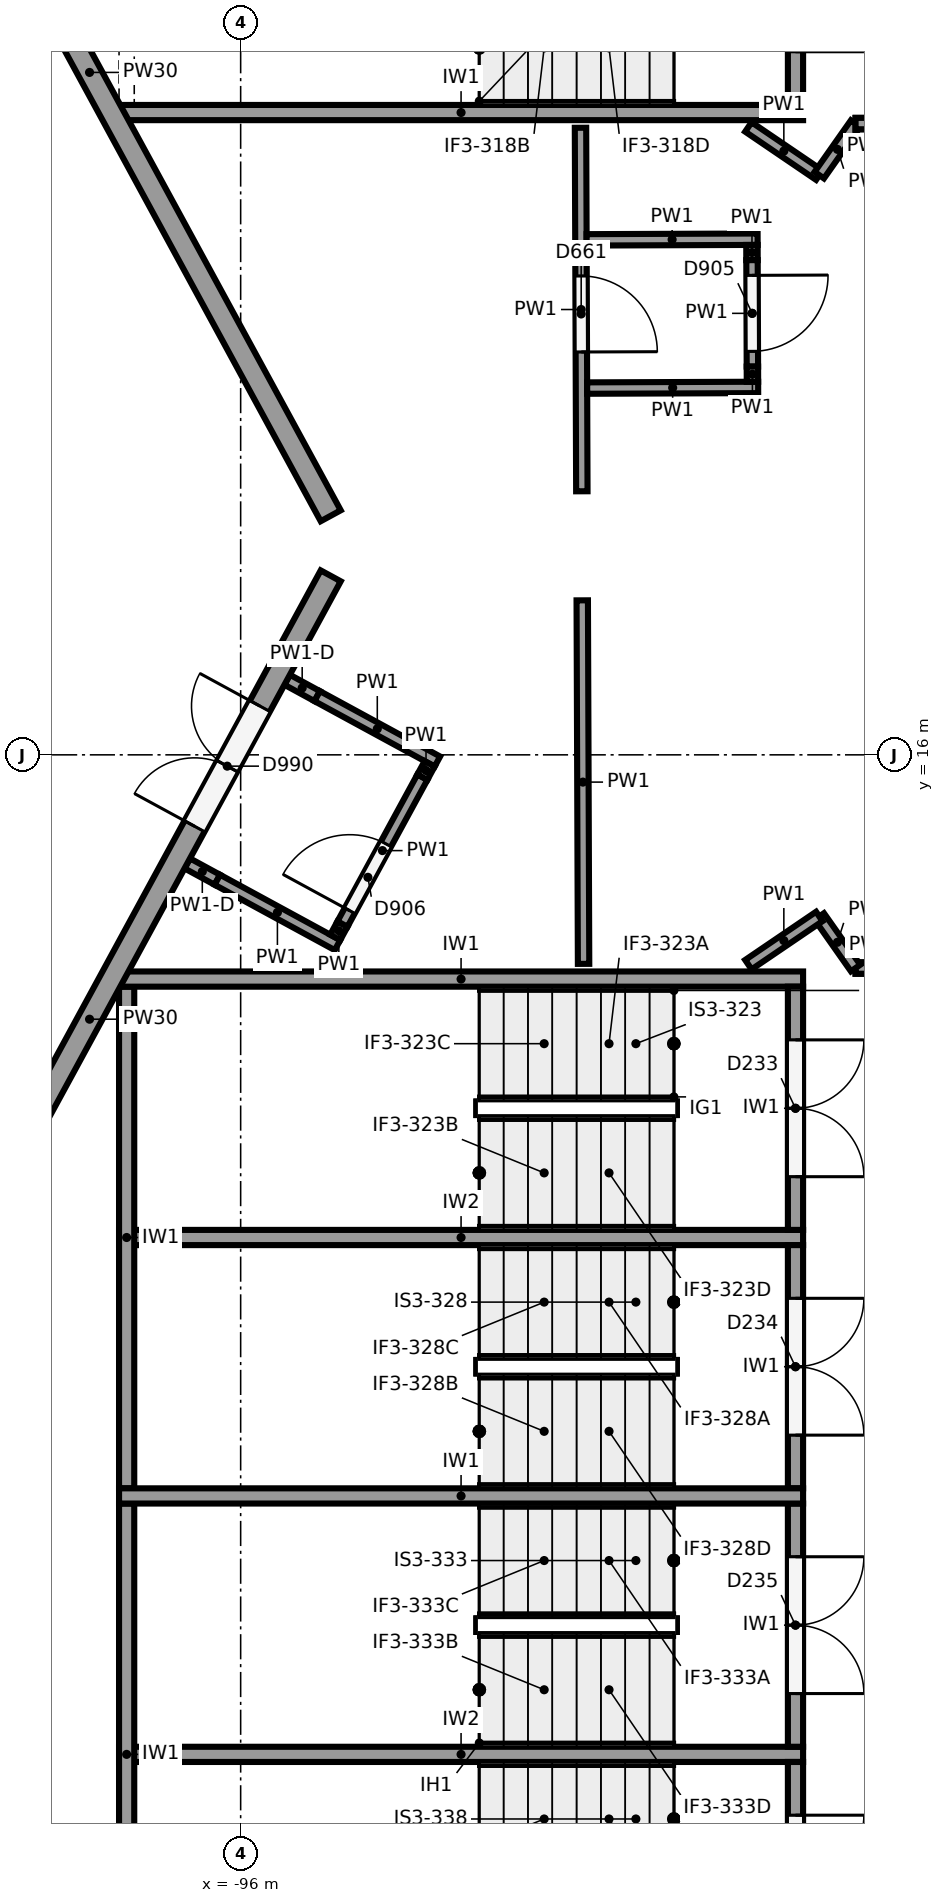
"""IFC4 building model, lengths in metres.
Left out: names, types, materials, properties, quantities, classifications, styles, units other than length and angle.
Written with IfcOpenShell. Run it as: python <this file> out.ifc"""

import sys

from ifc_helpers import new_model, si_unit, direction, frame, frame_2d, origin, origin_2d, place, context, subcontext, project, spatial, rectangle, circle, extrude, element, fill, save


model = new_model("IFC4")
c1 = context("Model", 3, precision=1e-05, world=origin(), true_north=direction((0.0, 1.0)))
c2 = subcontext(c1, "Body", "Model", "MODEL_VIEW")
j1 = project(units=[si_unit("LENGTHUNIT", "METRE"), si_unit("PLANEANGLEUNIT", "RADIAN")], contexts=[c1])
p1 = place(None, origin())
s1 = spatial("IfcSite", under=j1, at=p1, CompositionType="ELEMENT")
p2 = place(p1, origin())
s2 = spatial("IfcBuilding", under=s1, at=p2, CompositionType="ELEMENT")
p3 = place(p2, frame((0.0, 0.0, 6.5)))
s3 = spatial("IfcBuildingStorey", under=s2, at=p3, CompositionType="ELEMENT", Elevation=6.5)
p4 = place(p3, frame((-94.6, 18.75, 0.0), z_axis=(0.0, 0.0, 1.0), x_axis=(1.0, 0.0, 0.0)))
e1 = element("IfcColumn", 1, at=p4, inside=s3, PredefinedType="COLUMN", context=c2, shape_type="SweptSolid", body=[
    extrude(circle(Radius=0.45, at=origin_2d()), origin(), (0.0, 0.0, 1.0), 5.5),
])
p5 = place(p3, frame((-98.6, 18.75, 0.0), z_axis=(0.0, 0.0, 1.0), x_axis=(1.0, 0.0, 0.0)))
e2 = element("IfcColumn", 2, at=p5, inside=s3, PredefinedType="COLUMN", context=c2, shape_type="SweptSolid", body=[
    extrude(circle(Radius=0.4, at=origin_2d()), origin(), (0.0, 0.0, 1.0), 5.5),
])
p6 = place(p3, frame((-94.815, 19.145, 0.0), z_axis=(0.0, 0.0, 1.0), x_axis=(-0.477867771117, 0.878431780691, 0.0)))
e3 = element("IfcWall", 3, at=p6, inside=s3, PredefinedType="SOLIDWALL", context=c2, shape_type="SweptSolid", body=[
    extrude(rectangle(XDim=13.28, YDim=0.3, at=frame_2d((6.64, 0.0))), origin(), (0.0, 0.0, 1.0), 3.85),
])
p7 = place(p3, frame((-101.161, 6.689, 0.0), z_axis=(0.0, 0.0, 1.0), x_axis=(0.477867771117, 0.878431780691, 0.0)))
e4 = element("IfcWall", 4, at=p7, inside=s3, PredefinedType="SOLIDWALL", context=c2, shape_type="SweptSolid", body=[
    extrude(rectangle(XDim=13.28, YDim=0.3, at=frame_2d((6.64, 0.0))), origin(), (0.0, 0.0, 1.0), 3.85),
])
p8 = place(p7, frame((9.53, 0.0, 0.0)))
e5 = element("IfcOpeningElement", 5, at=p8, cuts=e4, PredefinedType="OPENING", context=c2, shape_type="SweptSolid", body=[
    extrude(rectangle(XDim=1.8, YDim=2.4, at=frame_2d((0.9, 1.2))), frame((0.0, 0.16, 0.0), z_axis=(0.0, -1.0, 0.0), x_axis=(1.0, 0.0, 0.0)), (0.0, 0.0, 1.0), 0.32),
])
p9 = place(p3, frame((-94.815, -5.855, 0.0), z_axis=(0.0, 0.0, 1.0), x_axis=(-0.477867771117, 0.878431780691, 0.0)))
e6 = element("IfcWall", 6, at=p9, inside=s3, PredefinedType="SOLIDWALL", context=c2, shape_type="SweptSolid", body=[
    extrude(rectangle(XDim=13.28, YDim=0.35, at=frame_2d((6.64, 0.0))), origin(), (0.0, 0.0, 1.0), 3.85),
])
p10 = place(p9, frame((3.95, 0.0, 0.0)))
e7 = element("IfcOpeningElement", 7, at=p10, cuts=e6, PredefinedType="OPENING", context=c2, shape_type="SweptSolid", body=[
    extrude(rectangle(XDim=1.0, YDim=2.1, at=frame_2d((0.5, 1.05))), frame((0.0, 0.185, 0.0), z_axis=(0.0, -1.0, 0.0), x_axis=(1.0, 0.0, 0.0)), (0.0, 0.0, 1.0), 0.37),
])
p11 = place(p3, frame((-97.6, 24.45, 0.0), z_axis=(0.0, 0.0, 1.0), x_axis=(1.0, 0.0, 0.0)))
e8 = element("IfcWall", 8, at=p11, inside=s3, PredefinedType="SHEAR", context=c2, shape_type="SweptSolid", body=[
    extrude(rectangle(XDim=9.0, YDim=0.2, at=frame_2d((4.5, 0.0))), origin(), (0.0, 0.0, 1.0), 5.15),
])
p12 = place(p3, frame((-97.5, 31.15, 0.0), z_axis=(0.0, 0.0, 1.0), x_axis=(0.0, -1.0, 0.0)))
e9 = element("IfcWall", 9, at=p12, inside=s3, PredefinedType="SHEAR", context=c2, shape_type="SweptSolid", body=[
    extrude(rectangle(XDim=6.6, YDim=0.2, at=frame_2d((3.3, 0.0))), origin(), (0.0, 0.0, 1.0), 5.15),
])
p13 = place(p3, frame((-88.7, 27.75, 0.0), z_axis=(0.0, 0.0, 1.0), x_axis=(0.0, -1.0, 0.0)))
e10 = element("IfcWall", 10, at=p13, inside=s3, PredefinedType="SHEAR", context=c2, shape_type="SweptSolid", body=[
    extrude(rectangle(XDim=3.2, YDim=0.2, at=frame_2d((1.6, 0.0))), origin(), (0.0, 0.0, 1.0), 5.15),
])
p14 = place(p13, frame((0.7, 0.0, 0.0)))
e11 = element("IfcOpeningElement", 11, at=p14, cuts=e10, PredefinedType="OPENING", context=c2, shape_type="SweptSolid", body=[
    extrude(rectangle(XDim=1.8, YDim=2.1, at=frame_2d((0.9, 1.05))), frame((0.0, 0.11, 0.0), z_axis=(0.0, -1.0, 0.0), x_axis=(1.0, 0.0, 0.0)), (0.0, 0.0, 1.0), 0.22),
])
for number, where, z_axis, x_axis in (
    (12, (-97.6, 13.05, 0.0), (0.0, 0.0, 1.0), (1.0, 0.0, 0.0)),
    (13, (-97.6, 6.25, 0.0), (0.0, 0.0, 1.0), (1.0, 0.0, 0.0)),
):
    element("IfcWall", number, at=place(p3, frame(where, z_axis=z_axis, x_axis=x_axis)), inside=s3, PredefinedType="SHEAR", context=c2, shape_type="SweptSolid", body=[
        extrude(rectangle(XDim=9.0, YDim=0.2, at=frame_2d((4.5, 0.0))), origin(), (0.0, 0.0, 1.0), 5.15),
    ])
for number, where, z_axis, x_axis in (
    (14, (-97.5, 12.95, 0.0), (0.0, 0.0, 1.0), (0.0, -1.0, 0.0)),
    (15, (-97.5, 6.15, 0.0), (0.0, 0.0, 1.0), (0.0, -1.0, 0.0)),
):
    element("IfcWall", number, at=place(p3, frame(where, z_axis=z_axis, x_axis=x_axis)), inside=s3, PredefinedType="SHEAR", context=c2, shape_type="SweptSolid", body=[
        extrude(rectangle(XDim=6.6, YDim=0.2, at=frame_2d((3.3, 0.0))), origin(), (0.0, 0.0, 1.0), 5.15),
    ])
for number, where, z_axis, x_axis in (
    (16, (-97.6, 9.65, 0.0), (0.0, 0.0, 1.0), (1.0, 0.0, 0.0)),
    (17, (-97.6, 2.85, 0.0), (0.0, 0.0, 1.0), (1.0, 0.0, 0.0)),
):
    element("IfcWall", number, at=place(p3, frame(where, z_axis=z_axis, x_axis=x_axis)), inside=s3, PredefinedType="SHEAR", context=c2, shape_type="SweptSolid", body=[
        extrude(rectangle(XDim=9.0, YDim=0.2, at=frame_2d((4.5, 0.0))), origin(), (0.0, 0.0, 1.0), 5.15),
    ])
p15 = place(p3, frame((-88.7, 12.95, 0.0), z_axis=(0.0, 0.0, 1.0), x_axis=(0.0, -1.0, 0.0)))
e18 = element("IfcWall", 18, at=p15, inside=s3, PredefinedType="SHEAR", context=c2, shape_type="SweptSolid", body=[
    extrude(rectangle(XDim=3.2, YDim=0.2, at=frame_2d((1.6, 0.0))), origin(), (0.0, 0.0, 1.0), 5.15),
])
p16 = place(p15, frame((0.7, 0.0, 0.0)))
e19 = element("IfcOpeningElement", 19, at=p16, cuts=e18, PredefinedType="OPENING", context=c2, shape_type="SweptSolid", body=[
    extrude(rectangle(XDim=1.8, YDim=2.1, at=frame_2d((0.9, 1.05))), frame((0.0, 0.11, 0.0), z_axis=(0.0, -1.0, 0.0), x_axis=(1.0, 0.0, 0.0)), (0.0, 0.0, 1.0), 0.22),
])
p17 = place(p3, frame((-88.7, 9.55, 0.0), z_axis=(0.0, 0.0, 1.0), x_axis=(0.0, -1.0, 0.0)))
e20 = element("IfcWall", 20, at=p17, inside=s3, PredefinedType="SHEAR", context=c2, shape_type="SweptSolid", body=[
    extrude(rectangle(XDim=3.2, YDim=0.2, at=frame_2d((1.6, 0.0))), origin(), (0.0, 0.0, 1.0), 5.15),
])
p18 = place(p17, frame((0.7, 0.0, 0.0)))
e21 = element("IfcOpeningElement", 21, at=p18, cuts=e20, PredefinedType="OPENING", context=c2, shape_type="SweptSolid", body=[
    extrude(rectangle(XDim=1.8, YDim=2.1, at=frame_2d((0.9, 1.05))), frame((0.0, 0.11, 0.0), z_axis=(0.0, -1.0, 0.0), x_axis=(1.0, 0.0, 0.0)), (0.0, 0.0, 1.0), 0.22),
])
p19 = place(p3, frame((-88.7, 6.15, 0.0), z_axis=(0.0, 0.0, 1.0), x_axis=(0.0, -1.0, 0.0)))
e22 = element("IfcWall", 22, at=p19, inside=s3, PredefinedType="SHEAR", context=c2, shape_type="SweptSolid", body=[
    extrude(rectangle(XDim=3.2, YDim=0.2, at=frame_2d((1.6, 0.0))), origin(), (0.0, 0.0, 1.0), 5.15),
])
p20 = place(p19, frame((0.7, 0.0, 0.0)))
e23 = element("IfcOpeningElement", 23, at=p20, cuts=e22, PredefinedType="OPENING", context=c2, shape_type="SweptSolid", body=[
    extrude(rectangle(XDim=1.8, YDim=2.1, at=frame_2d((0.9, 1.05))), frame((0.0, 0.11, 0.0), z_axis=(0.0, -1.0, 0.0), x_axis=(1.0, 0.0, 0.0)), (0.0, 0.0, 1.0), 0.22),
])
p21 = place(p3, frame((-88.7, 2.75, 0.0), z_axis=(0.0, 0.0, 1.0), x_axis=(0.0, -1.0, 0.0)))
e24 = element("IfcWall", 24, at=p21, inside=s3, PredefinedType="SHEAR", context=c2, shape_type="SweptSolid", body=[
    extrude(rectangle(XDim=3.2, YDim=0.2, at=frame_2d((1.6, 0.0))), origin(), (0.0, 0.0, 1.0), 5.15),
])
p22 = place(p21, frame((0.7, 0.0, 0.0)))
e25 = element("IfcOpeningElement", 25, at=p22, cuts=e24, PredefinedType="OPENING", context=c2, shape_type="SweptSolid", body=[
    extrude(rectangle(XDim=1.8, YDim=2.1, at=frame_2d((0.9, 1.05))), frame((0.0, 0.11, 0.0), z_axis=(0.0, -1.0, 0.0), x_axis=(1.0, 0.0, 0.0)), (0.0, 0.0, 1.0), 0.22),
])
p23 = place(p3, frame((-91.529, 24.25, 0.0), z_axis=(0.0, 0.0, 1.0), x_axis=(0.00367531974, -0.99999324599, 0.0)))
e26 = element("IfcWall", 26, at=p23, inside=s3, PredefinedType="PARTITIONING", context=c2, shape_type="SweptSolid", body=[
    extrude(rectangle(XDim=4.783, YDim=0.15, at=frame_2d((2.391, 0.0))), origin(), (0.0, 0.0, 1.0), 5.15),
])
p24 = place(p23, frame((1.95, 0.0, 0.0)))
e27 = element("IfcOpeningElement", 27, at=p24, cuts=e26, PredefinedType="OPENING", context=c2, shape_type="SweptSolid", body=[
    extrude(rectangle(XDim=1.0, YDim=2.1, at=frame_2d((0.5, 1.05))), frame((0.0, 0.085, 0.0), z_axis=(0.0, -1.0, 0.0), x_axis=(1.0, 0.0, 0.0)), (0.0, 0.0, 1.0), 0.17),
])
p25 = place(p3, frame((-91.506, 18.033, 0.0), z_axis=(0.0, 0.0, 1.0), x_axis=(0.003624274308, -0.999993432296, 0.0)))
e28 = element("IfcWall", 28, at=p25, inside=s3, PredefinedType="PARTITIONING", context=c2, shape_type="SweptSolid", body=[
    extrude(rectangle(XDim=4.783, YDim=0.15, at=frame_2d((2.391, 0.0))), origin(), (0.0, 0.0, 1.0), 5.15),
])
p26 = place(p3, frame((-89.32, 24.26, 0.0), z_axis=(0.0, 0.0, 1.0), x_axis=(0.827055308354, -0.562120553728, 0.0)))
e29 = element("IfcWall", 29, at=p26, inside=s3, PredefinedType="PARTITIONING", context=c2, shape_type="SweptSolid", body=[
    extrude(rectangle(XDim=1.128, YDim=0.15, at=frame_2d((0.564, 0.0))), origin(), (0.0, 0.0, 1.0), 5.15),
])
p27 = place(p3, frame((-88.387, 23.626, 0.0), z_axis=(0.0, 0.0, 1.0), x_axis=(0.575376756214, 0.817888493872, 0.0)))
e30 = element("IfcWall", 30, at=p27, inside=s3, PredefinedType="PARTITIONING", context=c2, shape_type="SweptSolid", body=[
    extrude(rectangle(XDim=0.83, YDim=0.15, at=frame_2d((0.415, 0.0))), origin(), (0.0, 0.0, 1.0), 5.15),
])
p28 = place(p3, frame((-87.909, 24.305, 0.0), z_axis=(0.0, 0.0, 1.0), x_axis=(1.0, 0.0, 0.0)))
e31 = element("IfcWall", 31, at=p28, inside=s3, PredefinedType="PARTITIONING", context=c2, shape_type="SweptSolid", body=[
    extrude(rectangle(XDim=3.704, YDim=0.15, at=frame_2d((1.852, 0.0))), origin(), (0.0, 0.0, 1.0), 4.05),
])
p29 = place(p28, frame((0.65, 0.0, 0.0)))
e32 = element("IfcOpeningElement", 32, at=p29, cuts=e31, PredefinedType="OPENING", context=c2, shape_type="SweptSolid", body=[
    extrude(rectangle(XDim=1.8, YDim=2.1, at=frame_2d((0.9, 1.05))), frame((0.0, 0.085, 0.0), z_axis=(0.0, -1.0, 0.0), x_axis=(1.0, 0.0, 0.0)), (0.0, 0.0, 1.0), 0.17),
])
p30 = place(p3, frame((-87.909, 24.305, 4.05), z_axis=(0.0, 0.0, 1.0), x_axis=(1.0, 0.0, 0.0)))
e33 = element("IfcWall", 33, at=p30, inside=s3, PredefinedType="PARTITIONING", context=c2, shape_type="SweptSolid", body=[
    extrude(rectangle(XDim=0.6, YDim=0.15, at=frame_2d((0.3, 0.0))), origin(), (0.0, 0.0, 1.0), 1.1),
])
p31 = place(p3, frame((-81.555, 13.195, 0.0), z_axis=(0.0, 0.0, 1.0), x_axis=(-1.0, 0.0, 0.0)))
e34 = element("IfcWall", 34, at=p31, inside=s3, PredefinedType="PARTITIONING", context=c2, shape_type="SweptSolid", body=[
    extrude(rectangle(XDim=6.354, YDim=0.15, at=frame_2d((3.177, 0.0))), origin(), (0.0, 0.0, 1.0), 4.05),
])
p32 = place(p31, frame((3.85, 0.0, 0.0)))
e35 = element("IfcOpeningElement", 35, at=p32, cuts=e34, PredefinedType="OPENING", context=c2, shape_type="SweptSolid", body=[
    extrude(rectangle(XDim=1.8, YDim=2.1, at=frame_2d((0.9, 1.05))), frame((0.0, 0.085, 0.0), z_axis=(0.0, -1.0, 0.0), x_axis=(1.0, 0.0, 0.0)), (0.0, 0.0, 1.0), 0.17),
])
p33 = place(p3, frame((-87.255, 13.195, 4.05), z_axis=(0.0, 0.0, 1.0), x_axis=(-1.0, 0.0, 0.0)))
e36 = element("IfcWall", 36, at=p33, inside=s3, PredefinedType="PARTITIONING", context=c2, shape_type="SweptSolid", body=[
    extrude(rectangle(XDim=0.654, YDim=0.15, at=frame_2d((0.327, 0.0))), origin(), (0.0, 0.0, 1.0), 1.1),
])
p34 = place(p3, frame((-87.909, 13.195, 0.0), z_axis=(0.0, 0.0, 1.0), x_axis=(-0.575573582652, 0.81774999294, 0.0)))
e37 = element("IfcWall", 37, at=p34, inside=s3, PredefinedType="PARTITIONING", context=c2, shape_type="SweptSolid", body=[
    extrude(rectangle(XDim=0.83, YDim=0.15, at=frame_2d((0.415, 0.0))), origin(), (0.0, 0.0, 1.0), 5.15),
])
p35 = place(p3, frame((-88.387, 13.874, 0.0), z_axis=(0.0, 0.0, 1.0), x_axis=(-0.827055308354, -0.562120553728, 0.0)))
e38 = element("IfcWall", 38, at=p35, inside=s3, PredefinedType="PARTITIONING", context=c2, shape_type="SweptSolid", body=[
    extrude(rectangle(XDim=1.128, YDim=0.15, at=frame_2d((0.564, 0.0))), origin(), (0.0, 0.0, 1.0), 5.15),
])
for number, where, z_axis, x_axis in (
    (39, (-91.448, 22.775, 0.0), (0.0, 0.0, 1.0), (1.0, 0.004, 0.0)),
    (40, (-91.441, 20.825, 0.0), (0.0, 0.0, 1.0), (1.0, 0.004, 0.0)),
):
    element("IfcWall", number, at=place(p3, frame(where, z_axis=z_axis, x_axis=x_axis)), inside=s3, PredefinedType="PARTITIONING", context=c2, shape_type="SweptSolid", body=[
        extrude(rectangle(XDim=2.25, YDim=0.15, at=frame_2d((1.125, 0.0))), origin(), (0.0, 0.0, 1.0), 5.15),
    ])
p36 = place(p3, frame((-89.273, 22.708, 0.0), z_axis=(0.0, 0.0, 1.0), x_axis=(0.003662979089, -0.99999329127, 0.0)))
e41 = element("IfcWall", 41, at=p36, inside=s3, PredefinedType="PARTITIONING", context=c2, shape_type="SweptSolid", body=[
    extrude(rectangle(XDim=0.2, YDim=0.15, at=frame_2d((0.1, 0.0))), origin(), (0.0, 0.0, 1.0), 5.15),
])
p37 = place(p3, frame((-89.272, 22.508, 0.0), z_axis=(0.0, 0.0, 1.0), x_axis=(0.00366234028, -0.999993293609, 0.0)))
e42 = element("IfcWall", 42, at=p37, inside=s3, PredefinedType="PARTITIONING", context=c2, shape_type="SweptSolid", body=[
    extrude(rectangle(XDim=1.4, YDim=0.15, at=frame_2d((0.7, 0.0))), origin(), (0.0, 0.0, 1.0), 5.15),
])
p38 = place(p37, frame((0.2, 0.0, 0.0)))
e43 = element("IfcOpeningElement", 43, at=p38, cuts=e42, PredefinedType="OPENING", context=c2, shape_type="SweptSolid", body=[
    extrude(rectangle(XDim=1.0, YDim=2.1, at=frame_2d((0.5, 1.05))), frame((0.0, 0.085, 0.0), z_axis=(0.0, -1.0, 0.0), x_axis=(1.0, 0.0, 0.0)), (0.0, 0.0, 1.0), 0.17),
])
p39 = place(p3, frame((-89.267, 21.108, 0.0), z_axis=(0.0, 0.0, 1.0), x_axis=(0.003658512101, -0.999993307622, 0.0)))
e44 = element("IfcWall", 44, at=p39, inside=s3, PredefinedType="PARTITIONING", context=c2, shape_type="SweptSolid", body=[
    extrude(rectangle(XDim=0.2, YDim=0.15, at=frame_2d((0.1, 0.0))), origin(), (0.0, 0.0, 1.0), 5.15),
])
p40 = place(p3, frame((-96.702, 14.572, 0.0), z_axis=(0.0, 0.0, 1.0), x_axis=(0.878372019733, -0.477977609256, 0.0)))
e45 = element("IfcWall", 45, at=p40, inside=s3, PredefinedType="PARTITIONING", context=c2, shape_type="SweptSolid", body=[
    extrude(rectangle(XDim=0.45, YDim=0.15, at=frame_2d((0.225, 0.0))), origin(), (0.0, 0.0, 1.0), 3.85),
])
p41 = place(p3, frame((-96.307, 14.357, 0.0), z_axis=(0.0, 0.0, 1.0), x_axis=(0.878428962466, -0.477872951632, 0.0)))
e46 = element("IfcWall", 46, at=p41, inside=s3, PredefinedType="PARTITIONING", context=c2, shape_type="SweptSolid", body=[
    extrude(rectangle(XDim=1.8, YDim=0.15, at=frame_2d((0.9, 0.0))), origin(), (0.0, 0.0, 1.0), 5.15),
])
p42 = place(p3, frame((-95.388, 16.987, 0.0), z_axis=(0.0, 0.0, 1.0), x_axis=(0.878372019733, -0.477977609256, 0.0)))
e47 = element("IfcWall", 47, at=p42, inside=s3, PredefinedType="PARTITIONING", context=c2, shape_type="SweptSolid", body=[
    extrude(rectangle(XDim=0.45, YDim=0.15, at=frame_2d((0.225, 0.0))), origin(), (0.0, 0.0, 1.0), 3.85),
])
p43 = place(p3, frame((-94.993, 16.772, 0.0), z_axis=(0.0, 0.0, 1.0), x_axis=(0.878459932885, -0.477816017223, 0.0)))
e48 = element("IfcWall", 48, at=p43, inside=s3, PredefinedType="PARTITIONING", context=c2, shape_type="SweptSolid", body=[
    extrude(rectangle(XDim=1.8, YDim=0.15, at=frame_2d((0.9, 0.0))), origin(), (0.0, 0.0, 1.0), 5.15),
])
p44 = place(p3, frame((-94.756, 13.598, 0.0), z_axis=(0.0, 0.0, 1.0), x_axis=(0.478168266369, 0.878268244352, 0.0)))
e49 = element("IfcWall", 49, at=p44, inside=s3, PredefinedType="PARTITIONING", context=c2, shape_type="SweptSolid", body=[
    extrude(rectangle(XDim=0.2, YDim=0.15, at=frame_2d((0.1, 0.0))), origin(), (0.0, 0.0, 1.0), 5.15),
])
p45 = place(p3, frame((-94.66, 13.774, 0.0), z_axis=(0.0, 0.0, 1.0), x_axis=(0.477887643273, 0.878420969927, 0.0)))
e50 = element("IfcWall", 50, at=p45, inside=s3, PredefinedType="PARTITIONING", context=c2, shape_type="SweptSolid", body=[
    extrude(rectangle(XDim=2.2, YDim=0.15, at=frame_2d((1.1, 0.0))), origin(), (0.0, 0.0, 1.0), 5.15),
])
p46 = place(p45, frame((0.2, 0.0, 0.0)))
e51 = element("IfcOpeningElement", 51, at=p46, cuts=e50, PredefinedType="OPENING", context=c2, shape_type="SweptSolid", body=[
    extrude(rectangle(XDim=1.0, YDim=2.1, at=frame_2d((0.5, 1.05))), frame((0.0, 0.085, 0.0), z_axis=(0.0, -1.0, 0.0), x_axis=(1.0, 0.0, 0.0)), (0.0, 0.0, 1.0), 0.17),
])
p47 = place(p3, frame((-93.609, 15.706, 0.0), z_axis=(0.0, 0.0, 1.0), x_axis=(0.477226530971, 0.878780312785, 0.0)))
e52 = element("IfcWall", 52, at=p47, inside=s3, PredefinedType="PARTITIONING", context=c2, shape_type="SweptSolid", body=[
    extrude(rectangle(XDim=0.2, YDim=0.15, at=frame_2d((0.1, 0.0))), origin(), (0.0, 0.0, 1.0), 5.15),
])
p48 = place(p8, origin())
e53 = element("IfcDoor", 53, at=p48, inside=s3, OperationType="DOUBLE_DOOR_SINGLE_SWING", PredefinedType="DOOR", context=c2, shape_type="SweptSolid", body=[
    extrude(rectangle(XDim=1.8, YDim=2.4, at=frame_2d((0.9, 1.2))), frame((0.0, 0.025, 0.0), z_axis=(0.0, -1.0, 0.0), x_axis=(1.0, 0.0, 0.0)), (0.0, 0.0, 1.0), 0.05),
])
fill(e5, e53)
p49 = place(p16, origin())
e54 = element("IfcDoor", 54, at=p49, inside=s3, OperationType="DOUBLE_DOOR_SINGLE_SWING", PredefinedType="DOOR", context=c2, shape_type="SweptSolid", body=[
    extrude(rectangle(XDim=1.8, YDim=2.1, at=frame_2d((0.9, 1.05))), frame((0.0, 0.025, 0.0), z_axis=(0.0, -1.0, 0.0), x_axis=(1.0, 0.0, 0.0)), (0.0, 0.0, 1.0), 0.05),
])
fill(e19, e54)
p50 = place(p18, origin())
e55 = element("IfcDoor", 55, at=p50, inside=s3, OperationType="DOUBLE_DOOR_SINGLE_SWING", PredefinedType="DOOR", context=c2, shape_type="SweptSolid", body=[
    extrude(rectangle(XDim=1.8, YDim=2.1, at=frame_2d((0.9, 1.05))), frame((0.0, 0.025, 0.0), z_axis=(0.0, -1.0, 0.0), x_axis=(1.0, 0.0, 0.0)), (0.0, 0.0, 1.0), 0.05),
])
fill(e21, e55)
p51 = place(p20, origin())
e56 = element("IfcDoor", 56, at=p51, inside=s3, OperationType="DOUBLE_DOOR_SINGLE_SWING", PredefinedType="DOOR", context=c2, shape_type="SweptSolid", body=[
    extrude(rectangle(XDim=1.8, YDim=2.1, at=frame_2d((0.9, 1.05))), frame((0.0, 0.025, 0.0), z_axis=(0.0, -1.0, 0.0), x_axis=(1.0, 0.0, 0.0)), (0.0, 0.0, 1.0), 0.05),
])
fill(e23, e56)
p52 = place(p22, origin())
e57 = element("IfcDoor", 57, at=p52, inside=s3, OperationType="DOUBLE_DOOR_SINGLE_SWING", PredefinedType="DOOR", context=c2, shape_type="SweptSolid", body=[
    extrude(rectangle(XDim=1.8, YDim=2.1, at=frame_2d((0.9, 1.05))), frame((0.0, 0.025, 0.0), z_axis=(0.0, -1.0, 0.0), x_axis=(1.0, 0.0, 0.0)), (0.0, 0.0, 1.0), 0.05),
])
fill(e25, e57)
p53 = place(p24, origin())
e58 = element("IfcDoor", 58, at=p53, inside=s3, OperationType="SINGLE_SWING_RIGHT", PredefinedType="DOOR", context=c2, shape_type="SweptSolid", body=[
    extrude(rectangle(XDim=1.0, YDim=2.1, at=frame_2d((0.5, 1.05))), frame((0.0, 0.025, 0.0), z_axis=(0.0, -1.0, 0.0), x_axis=(1.0, 0.0, 0.0)), (0.0, 0.0, 1.0), 0.05),
])
fill(e27, e58)
p54 = place(p38, origin())
e59 = element("IfcDoor", 59, at=p54, inside=s3, OperationType="SINGLE_SWING_LEFT", PredefinedType="DOOR", context=c2, shape_type="SweptSolid", body=[
    extrude(rectangle(XDim=1.0, YDim=2.1, at=frame_2d((0.5, 1.05))), frame((0.0, 0.025, 0.0), z_axis=(0.0, -1.0, 0.0), x_axis=(1.0, 0.0, 0.0)), (0.0, 0.0, 1.0), 0.05),
])
fill(e43, e59)
p55 = place(p46, origin())
e60 = element("IfcDoor", 60, at=p55, inside=s3, OperationType="SINGLE_SWING_LEFT", PredefinedType="DOOR", context=c2, shape_type="SweptSolid", body=[
    extrude(rectangle(XDim=1.0, YDim=2.1, at=frame_2d((0.5, 1.05))), frame((0.0, 0.025, 0.0), z_axis=(0.0, -1.0, 0.0), x_axis=(1.0, 0.0, 0.0)), (0.0, 0.0, 1.0), 0.05),
])
fill(e51, e60)
save(model, sys.argv[1])
